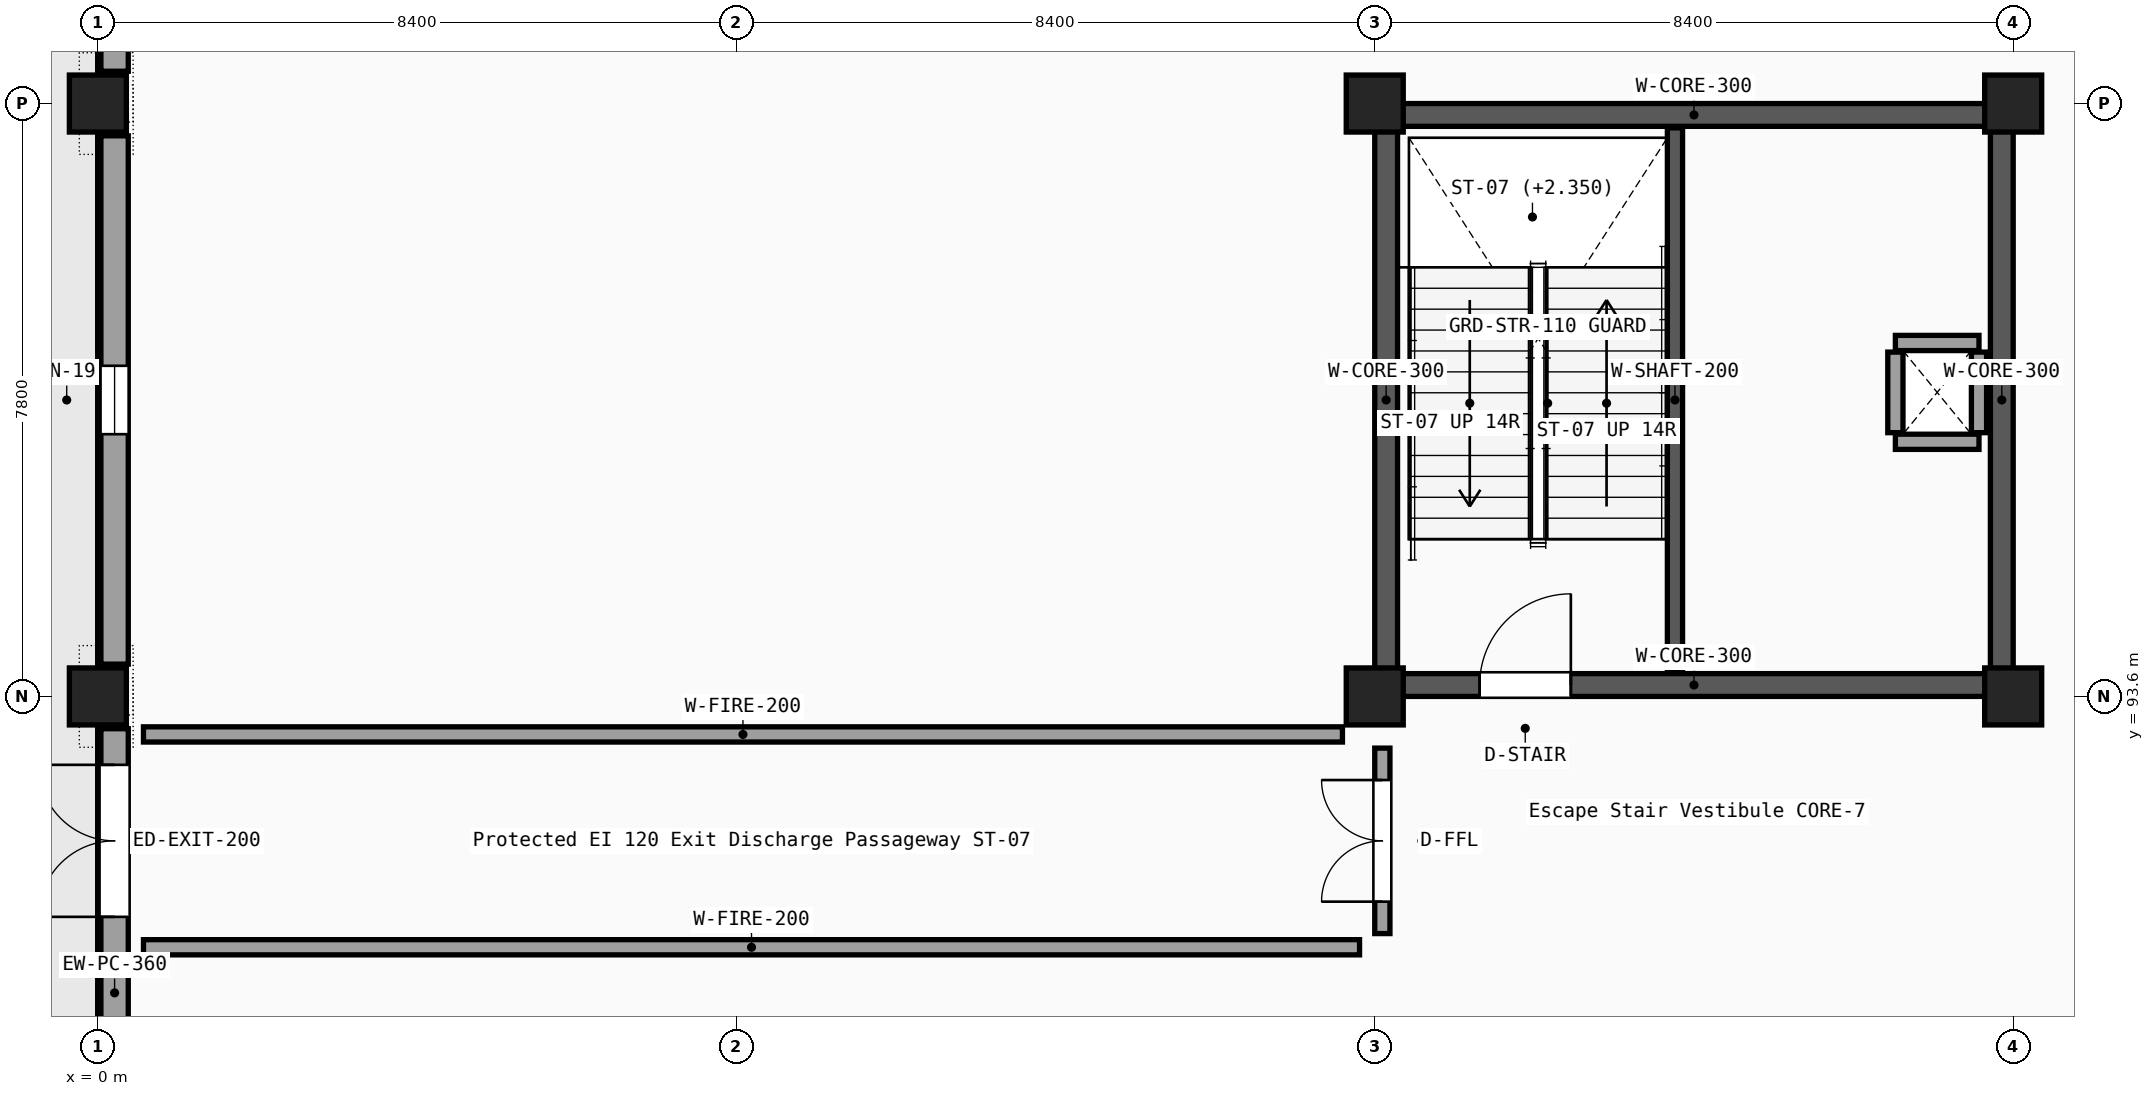
"""IFC4 building model, lengths in metres.
Left out: names, types, materials, properties, quantities, classifications, styles, units other than length and angle.
Written with IfcOpenShell. Run it as: python <this file> out.ifc"""

import sys

from ifc_helpers import new_model, si_unit, direction, frame, frame_2d, origin, origin_2d, place, context, subcontext, project, spatial, rectangle, extrude, element, fill, save


model = new_model("IFC4")
c1 = context("Model", 3, precision=1e-05, world=origin(), true_north=direction((0.0, 1.0)))
c2 = subcontext(c1, "Body", "Model", "MODEL_VIEW")
j1 = project(units=[si_unit("LENGTHUNIT", "METRE"), si_unit("PLANEANGLEUNIT", "RADIAN")], contexts=[c1])
p1 = place(None, origin())
s1 = spatial("IfcSite", under=j1, at=p1, CompositionType="ELEMENT")
p2 = place(p1, origin())
s2 = spatial("IfcBuilding", under=s1, at=p2, CompositionType="ELEMENT")
p3 = place(p2, origin())
s3 = spatial("IfcBuildingStorey", under=s2, at=p3, CompositionType="ELEMENT", Elevation=0.0)
for number, where, z_axis, x_axis in (
    (1, (0.0, 93.6, 0.0), (0.0, 0.0, 1.0), (1.0, 0.0, 0.0)),
    (2, (0.0, 101.4, 0.0), (0.0, 0.0, 1.0), (1.0, 0.0, 0.0)),
    (3, (16.8, 93.6, 0.0), (0.0, 0.0, 1.0), (1.0, 0.0, 0.0)),
    (4, (16.8, 101.4, 0.0), (0.0, 0.0, 1.0), (1.0, 0.0, 0.0)),
    (5, (25.2, 93.6, 0.0), (0.0, 0.0, 1.0), (1.0, 0.0, 0.0)),
    (6, (25.2, 101.4, 0.0), (0.0, 0.0, 1.0), (1.0, 0.0, 0.0)),
):
    element("IfcColumn", number, at=place(p3, frame(where, z_axis=z_axis, x_axis=x_axis)), inside=s3, PredefinedType="COLUMN", context=c2, shape_type="SweptSolid", body=[
        extrude(rectangle(XDim=0.75, YDim=0.75, at=origin_2d()), origin(), (0.0, 0.0, 1.0), 5.1),
    ])
p4 = place(p3, frame((0.22, 86.225, 0.0), z_axis=(0.0, 0.0, 1.0), x_axis=(0.0, 1.0, 0.0)))
e7 = element("IfcWall", 7, at=p4, inside=s3, PredefinedType="SOLIDWALL", context=c2, shape_type="SweptSolid", body=[
    extrude(rectangle(XDim=6.95, YDim=0.36, at=frame_2d((3.475, 0.0))), origin(), (0.0, 0.0, 1.0), 4.26),
])
p5 = place(p4, frame((4.475, 0.0, 0.0)))
e8 = element("IfcOpeningElement", 8, at=p5, cuts=e7, PredefinedType="OPENING", context=c2, shape_type="SweptSolid", body=[
    extrude(rectangle(XDim=2.0, YDim=2.25, at=frame_2d((1.0, 1.125))), frame((0.0, 0.19, 0.0), z_axis=(0.0, -1.0, 0.0), x_axis=(1.0, 0.0, 0.0)), (0.0, 0.0, 1.0), 0.38),
])
p6 = place(p3, frame((0.22, 94.025, 0.0), z_axis=(0.0, 0.0, 1.0), x_axis=(0.0, 1.0, 0.0)))
e9 = element("IfcWall", 9, at=p6, inside=s3, PredefinedType="SOLIDWALL", context=c2, shape_type="SweptSolid", body=[
    extrude(rectangle(XDim=6.95, YDim=0.36, at=frame_2d((3.475, 0.0))), origin(), (0.0, 0.0, 1.0), 4.26),
])
p7 = place(p6, frame((3.025, 0.0, 0.9)))
e10 = element("IfcOpeningElement", 10, at=p7, cuts=e9, PredefinedType="OPENING", context=c2, shape_type="SweptSolid", body=[
    extrude(rectangle(XDim=0.9, YDim=1.8, at=frame_2d((0.45, 0.9))), frame((0.0, 0.19, 0.0), z_axis=(0.0, -1.0, 0.0), x_axis=(1.0, 0.0, 0.0)), (0.0, 0.0, 1.0), 0.38),
])
p8 = place(p3, frame((0.22, 101.825, 0.0), z_axis=(0.0, 0.0, 1.0), x_axis=(0.0, 1.0, 0.0)))
e11 = element("IfcWall", 11, at=p8, inside=s3, PredefinedType="SOLIDWALL", context=c2, shape_type="SweptSolid", body=[
    extrude(rectangle(XDim=6.95, YDim=0.36, at=frame_2d((3.475, 0.0))), origin(), (0.0, 0.0, 1.0), 4.26),
])
p9 = place(p8, frame((2.6, 0.0, 0.75)))
e12 = element("IfcOpeningElement", 12, at=p9, cuts=e11, PredefinedType="OPENING", context=c2, shape_type="SweptSolid", body=[
    extrude(rectangle(XDim=1.75, YDim=1.9, at=frame_2d((0.875, 0.95))), frame((0.0, 0.19, 0.0), z_axis=(0.0, -1.0, 0.0), x_axis=(1.0, 0.0, 0.0)), (0.0, 0.0, 1.0), 0.38),
])
p10 = place(p3, frame((16.8, 93.75, 0.0), z_axis=(0.0, 0.0, 1.0), x_axis=(1.0, 0.0, 0.0)))
e13 = element("IfcWall", 13, at=p10, inside=s3, PredefinedType="SHEAR", context=c2, shape_type="SweptSolid", body=[
    extrude(rectangle(XDim=8.4, YDim=0.3, at=frame_2d((4.2, 0.0))), origin(), (0.0, 0.0, 1.0), 4.83),
])
p11 = place(p10, frame((1.38, 0.0, 0.0)))
e14 = element("IfcOpeningElement", 14, at=p11, cuts=e13, PredefinedType="OPENING", context=c2, shape_type="SweptSolid", body=[
    extrude(rectangle(XDim=1.2, YDim=2.15, at=frame_2d((0.6, 1.075))), frame((0.0, 0.16, 0.0), z_axis=(0.0, -1.0, 0.0), x_axis=(1.0, 0.0, 0.0)), (0.0, 0.0, 1.0), 0.32),
])
p12 = place(p3, frame((16.8, 101.25, 0.0), z_axis=(0.0, 0.0, 1.0), x_axis=(1.0, 0.0, 0.0)))
e15 = element("IfcWall", 15, at=p12, inside=s3, PredefinedType="SHEAR", context=c2, shape_type="SweptSolid", body=[
    extrude(rectangle(XDim=8.4, YDim=0.3, at=frame_2d((4.2, 0.0))), origin(), (0.0, 0.0, 1.0), 4.83),
])
for number, where, z_axis, x_axis in (
    (16, (16.95, 93.9, 0.0), (0.0, 0.0, 1.0), (0.0, 1.0, 0.0)),
    (17, (25.05, 93.9, 0.0), (0.0, 0.0, 1.0), (0.0, 1.0, 0.0)),
):
    element("IfcWall", number, at=place(p3, frame(where, z_axis=z_axis, x_axis=x_axis)), inside=s3, PredefinedType="SHEAR", context=c2, shape_type="SweptSolid", body=[
        extrude(rectangle(XDim=7.2, YDim=0.3, at=frame_2d((3.6, 0.0))), origin(), (0.0, 0.0, 1.0), 4.83),
    ])
p13 = place(p3, frame((20.75, 93.92, 0.0), z_axis=(0.0, 0.0, 1.0), x_axis=(0.0, 1.0, 0.0)))
e18 = element("IfcWall", 18, at=p13, inside=s3, PredefinedType="SHEAR", context=c2, shape_type="SweptSolid", body=[
    extrude(rectangle(XDim=7.16, YDim=0.2, at=frame_2d((3.58, 0.0))), origin(), (0.0, 0.0, 1.0), 4.83),
])
for number, where, z_axis, x_axis in (
    (19, (23.65, 96.95, 0.0), (0.0, 0.0, 1.0), (1.0, 0.0, 0.0)),
    (20, (23.65, 98.25, 0.0), (0.0, 0.0, 1.0), (1.0, 0.0, 0.0)),
):
    element("IfcWall", number, at=place(p3, frame(where, z_axis=z_axis, x_axis=x_axis)), inside=s3, PredefinedType="PARTITIONING", context=c2, shape_type="SweptSolid", body=[
        extrude(rectangle(XDim=1.1, YDim=0.2, at=frame_2d((0.55, 0.0))), origin(), (0.0, 0.0, 1.0), 4.21),
    ])
for number, where, z_axis, x_axis in (
    (21, (23.65, 97.07, 0.0), (0.0, 0.0, 1.0), (0.0, 1.0, 0.0)),
    (22, (24.75, 97.07, 0.0), (0.0, 0.0, 1.0), (0.0, 1.0, 0.0)),
):
    element("IfcWall", number, at=place(p3, frame(where, z_axis=z_axis, x_axis=x_axis)), inside=s3, PredefinedType="PARTITIONING", context=c2, shape_type="SweptSolid", body=[
        extrude(rectangle(XDim=1.06, YDim=0.2, at=frame_2d((0.53, 0.0))), origin(), (0.0, 0.0, 1.0), 4.21),
    ])
p14 = place(p3, frame((0.6, 90.3, 0.0), z_axis=(0.0, 0.0, 1.0), x_axis=(1.0, 0.0, 0.0)))
e23 = element("IfcWall", 23, at=p14, inside=s3, PredefinedType="PARTITIONING", context=c2, shape_type="SweptSolid", body=[
    extrude(rectangle(XDim=16.0, YDim=0.2, at=frame_2d((8.0, 0.0))), origin(), (0.0, 0.0, 1.0), 4.46),
])
p15 = place(p3, frame((0.6, 93.1, 0.0), z_axis=(0.0, 0.0, 1.0), x_axis=(1.0, 0.0, 0.0)))
e24 = element("IfcWall", 24, at=p15, inside=s3, PredefinedType="PARTITIONING", context=c2, shape_type="SweptSolid", body=[
    extrude(rectangle(XDim=15.775, YDim=0.2, at=frame_2d((7.887, 0.0))), origin(), (0.0, 0.0, 1.0), 4.81),
])
p16 = place(p3, frame((16.9, 90.48, 0.0), z_axis=(0.0, 0.0, 1.0), x_axis=(0.0, 1.0, 0.0)))
e25 = element("IfcWall", 25, at=p16, inside=s3, PredefinedType="PARTITIONING", context=c2, shape_type="SweptSolid", body=[
    extrude(rectangle(XDim=2.44, YDim=0.2, at=frame_2d((1.22, 0.0))), origin(), (0.0, 0.0, 1.0), 4.46),
])
p17 = place(p16, frame((0.42, 0.0, 0.0)))
e26 = element("IfcOpeningElement", 26, at=p17, cuts=e25, PredefinedType="OPENING", context=c2, shape_type="SweptSolid", body=[
    extrude(rectangle(XDim=1.6, YDim=2.2, at=frame_2d((0.8, 1.1))), frame((0.0, 0.11, 0.0), z_axis=(0.0, -1.0, 0.0), x_axis=(1.0, 0.0, 0.0)), (0.0, 0.0, 1.0), 0.22),
])
p18 = place(p5, origin())
e27 = element("IfcDoor", 27, at=p18, inside=s3, OperationType="DOUBLE_DOOR_SINGLE_SWING", PredefinedType="DOOR", context=c2, shape_type="SweptSolid", body=[
    extrude(rectangle(XDim=2.0, YDim=2.25, at=frame_2d((1.0, 1.125))), frame((0.0, 0.025, 0.0), z_axis=(0.0, -1.0, 0.0), x_axis=(1.0, 0.0, 0.0)), (0.0, 0.0, 1.0), 0.05),
])
fill(e8, e27)
p19 = place(p7, origin())
e28 = element("IfcWindow", 28, at=p19, inside=s3, PartitioningType="SINGLE_PANEL", PredefinedType="WINDOW", context=c2, shape_type="SweptSolid", body=[
    extrude(rectangle(XDim=0.9, YDim=1.8, at=frame_2d((0.45, 0.9))), frame((0.0, 0.03, 0.0), z_axis=(0.0, -1.0, 0.0), x_axis=(1.0, 0.0, 0.0)), (0.0, 0.0, 1.0), 0.06),
])
fill(e10, e28)
p20 = place(p11, origin())
e29 = element("IfcDoor", 29, at=p20, inside=s3, OperationType="SINGLE_SWING_RIGHT", PredefinedType="DOOR", context=c2, shape_type="SweptSolid", body=[
    extrude(rectangle(XDim=1.2, YDim=2.15, at=frame_2d((0.6, 1.075))), frame((0.0, 0.025, 0.0), z_axis=(0.0, -1.0, 0.0), x_axis=(1.0, 0.0, 0.0)), (0.0, 0.0, 1.0), 0.05),
])
fill(e14, e29)
p21 = place(p17, origin())
e30 = element("IfcDoor", 30, at=p21, inside=s3, OperationType="DOUBLE_DOOR_SINGLE_SWING", PredefinedType="DOOR", context=c2, shape_type="SweptSolid", body=[
    extrude(rectangle(XDim=1.6, YDim=2.2, at=frame_2d((0.8, 1.1))), frame((0.0, 0.025, 0.0), z_axis=(0.0, -1.0, 0.0), x_axis=(1.0, 0.0, 0.0)), (0.0, 0.0, 1.0), 0.05),
])
fill(e26, e30)
save(model, sys.argv[1])
